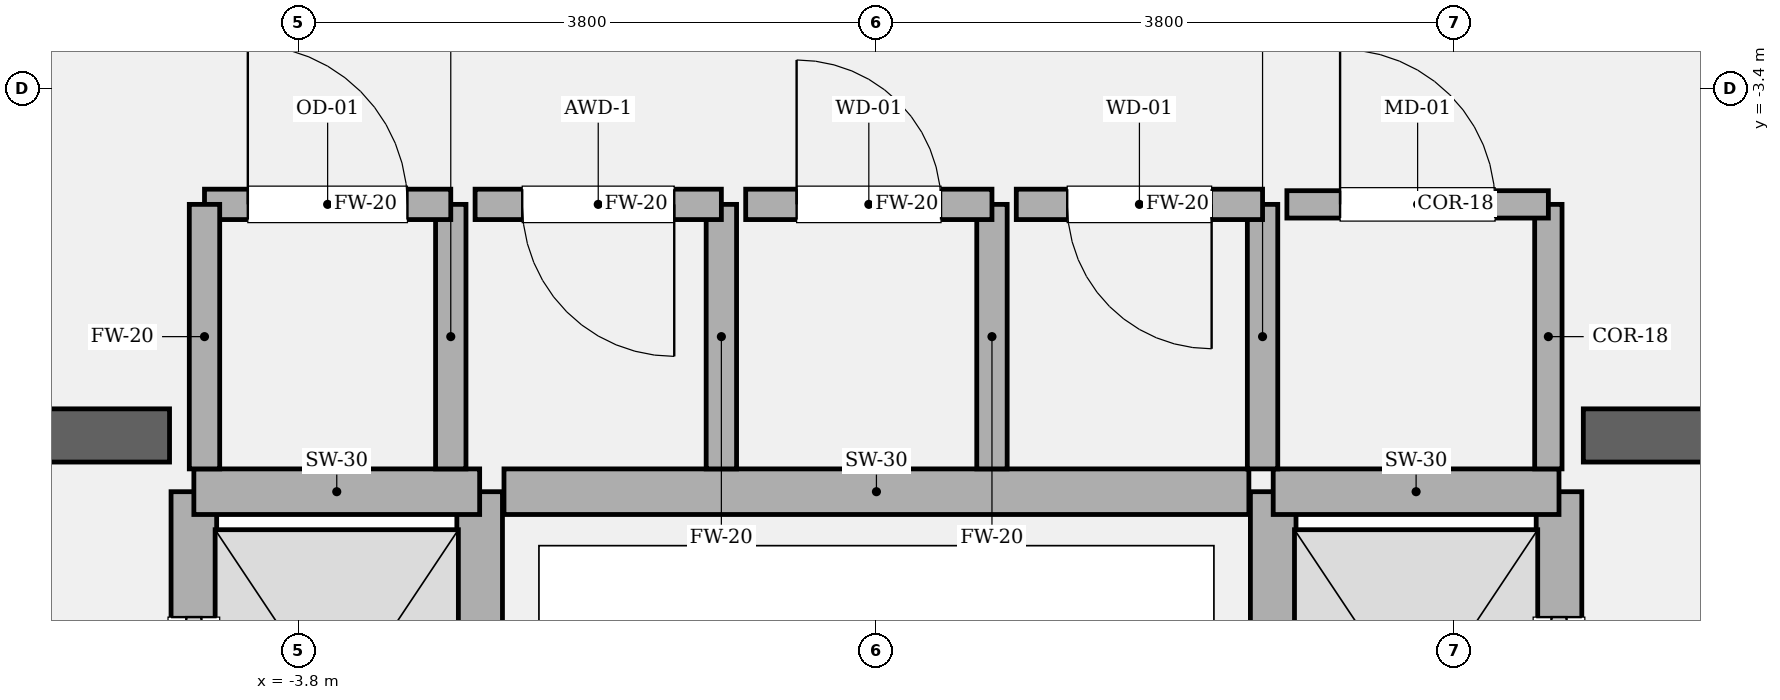
"""IFC4 building model, lengths in metres.
Left out: names, types, materials, properties, quantities, classifications, styles, units other than length and angle.
Written with IfcOpenShell. Run it as: python <this file> out.ifc"""

import sys

from ifc_helpers import new_model, si_unit, direction, frame, frame_2d, origin, place, context, subcontext, project, spatial, rectangle, extrude, element, fill, save


model = new_model("IFC4")
c1 = context("Model", 3, precision=1e-05, world=origin(), true_north=direction((0.0, 1.0)))
c2 = subcontext(c1, "Body", "Model", "MODEL_VIEW")
j1 = project(units=[si_unit("LENGTHUNIT", "METRE"), si_unit("PLANEANGLEUNIT", "RADIAN")], contexts=[c1])
p1 = place(None, origin())
s1 = spatial("IfcSite", under=j1, at=p1, CompositionType="ELEMENT")
p2 = place(p1, origin())
s2 = spatial("IfcBuilding", under=s1, at=p2, CompositionType="ELEMENT")
p3 = place(p2, frame((0.0, 0.0, 52.5)))
s3 = spatial("IfcBuildingStorey", under=s2, at=p3, CompositionType="ELEMENT", Elevation=52.5)
p4 = place(p3, frame((-9.825, -5.68, 0.0), z_axis=(0.0, 0.0, 1.0), x_axis=(1.0, 0.0, 0.0)))
e1 = element("IfcWall", 1, at=p4, inside=s3, PredefinedType="SOLIDWALL", context=c2, shape_type="SweptSolid", body=[
    extrude(rectangle(XDim=5.175, YDim=0.35, at=frame_2d((2.587, 0.0))), origin(), (0.0, 0.0, 1.0), 4.05),
])
p5 = place(p4, frame((1.285, 0.0, 0.0)))
e2 = element("IfcOpeningElement", 2, at=p5, cuts=e1, PredefinedType="OPENING", context=c2, shape_type="SweptSolid", body=[
    extrude(rectangle(XDim=1.18, YDim=2.2, at=frame_2d((0.59, 1.1))), frame((0.0, 0.185, 0.0), z_axis=(0.0, -1.0, 0.0), x_axis=(1.0, 0.0, 0.0)), (0.0, 0.0, 1.0), 0.37),
])
p6 = place(p3, frame((4.65, -5.68, 0.0), z_axis=(0.0, 0.0, 1.0), x_axis=(1.0, 0.0, 0.0)))
e3 = element("IfcWall", 3, at=p6, inside=s3, PredefinedType="SOLIDWALL", context=c2, shape_type="SweptSolid", body=[
    extrude(rectangle(XDim=5.175, YDim=0.35, at=frame_2d((2.587, 0.0))), origin(), (0.0, 0.0, 1.0), 4.05),
])
p7 = place(p6, frame((2.71, 0.0, 0.0)))
e4 = element("IfcOpeningElement", 4, at=p7, cuts=e3, PredefinedType="OPENING", context=c2, shape_type="SweptSolid", body=[
    extrude(rectangle(XDim=1.18, YDim=2.2, at=frame_2d((0.59, 1.1))), frame((0.0, 0.185, 0.0), z_axis=(0.0, -1.0, 0.0), x_axis=(1.0, 0.0, 0.0)), (0.0, 0.0, 1.0), 0.37),
])
p8 = place(p3, frame((-4.49, -8.82, 0.0), z_axis=(0.0, 0.0, 1.0), x_axis=(0.0, 1.0, 0.0)))
e5 = element("IfcWall", 5, at=p8, inside=s3, PredefinedType="SOLIDWALL", context=c2, shape_type="SweptSolid", body=[
    extrude(rectangle(XDim=2.77, YDim=0.3, at=frame_2d((1.385, 0.0))), origin(), (0.0, 0.0, 1.0), 3.81),
])
p9 = place(p8, frame((0.825, 0.0, 0.0)))
e6 = element("IfcOpeningElement", 6, at=p9, cuts=e5, PredefinedType="OPENING", context=c2, shape_type="SweptSolid", body=[
    extrude(rectangle(XDim=1.12, YDim=2.25, at=frame_2d((0.56, 1.125))), frame((0.0, 0.16, 0.0), z_axis=(0.0, -1.0, 0.0), x_axis=(1.0, 0.0, 0.0)), (0.0, 0.0, 1.0), 0.32),
])
p10 = place(p3, frame((-2.61, -8.82, 0.0), z_axis=(0.0, 0.0, 1.0), x_axis=(0.0, 1.0, 0.0)))
e7 = element("IfcWall", 7, at=p10, inside=s3, PredefinedType="SOLIDWALL", context=c2, shape_type="SweptSolid", body=[
    extrude(rectangle(XDim=2.77, YDim=0.3, at=frame_2d((1.385, 0.0))), origin(), (0.0, 0.0, 1.0), 3.81),
])
p11 = place(p3, frame((-4.49, -6.05, 0.0), z_axis=(0.0, 0.0, 1.0), x_axis=(1.0, 0.0, 0.0)))
e8 = element("IfcWall", 8, at=p11, inside=s3, PredefinedType="SOLIDWALL", context=c2, shape_type="SweptSolid", body=[
    extrude(rectangle(XDim=1.88, YDim=0.3, at=frame_2d((0.94, 0.0))), origin(), (0.0, 0.0, 1.0), 3.81),
])
p12 = place(p3, frame((4.49, -8.82, 0.0), z_axis=(0.0, 0.0, 1.0), x_axis=(0.0, 1.0, 0.0)))
e9 = element("IfcWall", 9, at=p12, inside=s3, PredefinedType="SOLIDWALL", context=c2, shape_type="SweptSolid", body=[
    extrude(rectangle(XDim=2.77, YDim=0.3, at=frame_2d((1.385, 0.0))), origin(), (0.0, 0.0, 1.0), 3.81),
])
p13 = place(p12, frame((0.825, 0.0, 0.0)))
e10 = element("IfcOpeningElement", 10, at=p13, cuts=e9, PredefinedType="OPENING", context=c2, shape_type="SweptSolid", body=[
    extrude(rectangle(XDim=1.12, YDim=2.25, at=frame_2d((0.56, 1.125))), frame((0.0, 0.16, 0.0), z_axis=(0.0, -1.0, 0.0), x_axis=(1.0, 0.0, 0.0)), (0.0, 0.0, 1.0), 0.32),
])
p14 = place(p3, frame((2.61, -8.82, 0.0), z_axis=(0.0, 0.0, 1.0), x_axis=(0.0, 1.0, 0.0)))
e11 = element("IfcWall", 11, at=p14, inside=s3, PredefinedType="SOLIDWALL", context=c2, shape_type="SweptSolid", body=[
    extrude(rectangle(XDim=2.77, YDim=0.3, at=frame_2d((1.385, 0.0))), origin(), (0.0, 0.0, 1.0), 3.81),
])
p15 = place(p3, frame((2.61, -6.05, 0.0), z_axis=(0.0, 0.0, 1.0), x_axis=(1.0, 0.0, 0.0)))
e12 = element("IfcWall", 12, at=p15, inside=s3, PredefinedType="SOLIDWALL", context=c2, shape_type="SweptSolid", body=[
    extrude(rectangle(XDim=1.88, YDim=0.3, at=frame_2d((0.94, 0.0))), origin(), (0.0, 0.0, 1.0), 3.81),
])
p16 = place(p3, frame((-2.45, -6.05, 0.0), z_axis=(0.0, 0.0, 1.0), x_axis=(1.0, 0.0, 0.0)))
e13 = element("IfcWall", 13, at=p16, inside=s3, PredefinedType="SOLIDWALL", context=c2, shape_type="SweptSolid", body=[
    extrude(rectangle(XDim=4.9, YDim=0.3, at=frame_2d((2.45, 0.0))), origin(), (0.0, 0.0, 1.0), 3.81),
])
p17 = place(p3, frame((-2.8, -5.9, 0.0), z_axis=(0.0, 0.0, 1.0), x_axis=(0.0, 1.0, 0.0)))
e14 = element("IfcWall", 14, at=p17, inside=s3, PredefinedType="SOLIDWALL", context=c2, shape_type="SweptSolid", body=[
    extrude(rectangle(XDim=1.74, YDim=0.2, at=frame_2d((0.87, 0.0))), origin(), (0.0, 0.0, 1.0), 3.81),
])
p18 = place(p3, frame((-2.8, -4.16, 0.0), z_axis=(0.0, 0.0, 1.0), x_axis=(-1.0, 0.0, 0.0)))
e15 = element("IfcWall", 15, at=p18, inside=s3, PredefinedType="SOLIDWALL", context=c2, shape_type="SweptSolid", body=[
    extrude(rectangle(XDim=1.62, YDim=0.2, at=frame_2d((0.81, 0.0))), origin(), (0.0, 0.0, 1.0), 3.81),
])
p19 = place(p18, frame((0.285, 0.0, 0.0)))
e16 = element("IfcOpeningElement", 16, at=p19, cuts=e15, PredefinedType="OPENING", context=c2, shape_type="SweptSolid", body=[
    extrude(rectangle(XDim=1.05, YDim=2.2, at=frame_2d((0.525, 1.1))), frame((0.0, 0.11, 0.0), z_axis=(0.0, -1.0, 0.0), x_axis=(1.0, 0.0, 0.0)), (0.0, 0.0, 1.0), 0.22),
])
for number, where, z_axis, x_axis in (
    (17, (-4.42, -4.16, 0.0), (0.0, 0.0, 1.0), (0.0, -1.0, 0.0)),
    (18, (-1.02, -5.9, 0.0), (0.0, 0.0, 1.0), (0.0, 1.0, 0.0)),
):
    element("IfcWall", number, at=place(p3, frame(where, z_axis=z_axis, x_axis=x_axis)), inside=s3, PredefinedType="SOLIDWALL", context=c2, shape_type="SweptSolid", body=[
        extrude(rectangle(XDim=1.74, YDim=0.2, at=frame_2d((0.87, 0.0))), origin(), (0.0, 0.0, 1.0), 3.81),
    ])
p20 = place(p3, frame((-1.02, -4.16, 0.0), z_axis=(0.0, 0.0, 1.0), x_axis=(-1.0, 0.0, 0.0)))
e19 = element("IfcWall", 19, at=p20, inside=s3, PredefinedType="SOLIDWALL", context=c2, shape_type="SweptSolid", body=[
    extrude(rectangle(XDim=1.62, YDim=0.2, at=frame_2d((0.81, 0.0))), origin(), (0.0, 0.0, 1.0), 3.81),
])
p21 = place(p20, frame((0.31, 0.0, 0.0)))
e20 = element("IfcOpeningElement", 20, at=p21, cuts=e19, PredefinedType="OPENING", context=c2, shape_type="SweptSolid", body=[
    extrude(rectangle(XDim=1.0, YDim=2.15, at=frame_2d((0.5, 1.075))), frame((0.0, 0.11, 0.0), z_axis=(0.0, -1.0, 0.0), x_axis=(1.0, 0.0, 0.0)), (0.0, 0.0, 1.0), 0.22),
])
p22 = place(p3, frame((0.76, -5.9, 0.0), z_axis=(0.0, 0.0, 1.0), x_axis=(0.0, 1.0, 0.0)))
e21 = element("IfcWall", 21, at=p22, inside=s3, PredefinedType="SOLIDWALL", context=c2, shape_type="SweptSolid", body=[
    extrude(rectangle(XDim=1.74, YDim=0.2, at=frame_2d((0.87, 0.0))), origin(), (0.0, 0.0, 1.0), 3.81),
])
p23 = place(p3, frame((0.76, -4.16, 0.0), z_axis=(0.0, 0.0, 1.0), x_axis=(-1.0, 0.0, 0.0)))
e22 = element("IfcWall", 22, at=p23, inside=s3, PredefinedType="SOLIDWALL", context=c2, shape_type="SweptSolid", body=[
    extrude(rectangle(XDim=1.62, YDim=0.2, at=frame_2d((0.81, 0.0))), origin(), (0.0, 0.0, 1.0), 3.81),
])
p24 = place(p23, frame((0.335, 0.0, 0.0)))
e23 = element("IfcOpeningElement", 23, at=p24, cuts=e22, PredefinedType="OPENING", context=c2, shape_type="SweptSolid", body=[
    extrude(rectangle(XDim=0.95, YDim=2.15, at=frame_2d((0.475, 1.075))), frame((0.0, 0.11, 0.0), z_axis=(0.0, -1.0, 0.0), x_axis=(1.0, 0.0, 0.0)), (0.0, 0.0, 1.0), 0.22),
])
p25 = place(p3, frame((2.54, -5.9, 0.0), z_axis=(0.0, 0.0, 1.0), x_axis=(0.0, 1.0, 0.0)))
e24 = element("IfcWall", 24, at=p25, inside=s3, PredefinedType="SOLIDWALL", context=c2, shape_type="SweptSolid", body=[
    extrude(rectangle(XDim=1.74, YDim=0.2, at=frame_2d((0.87, 0.0))), origin(), (0.0, 0.0, 1.0), 3.81),
])
p26 = place(p3, frame((2.54, -4.16, 0.0), z_axis=(0.0, 0.0, 1.0), x_axis=(-1.0, 0.0, 0.0)))
e25 = element("IfcWall", 25, at=p26, inside=s3, PredefinedType="SOLIDWALL", context=c2, shape_type="SweptSolid", body=[
    extrude(rectangle(XDim=1.62, YDim=0.2, at=frame_2d((0.81, 0.0))), origin(), (0.0, 0.0, 1.0), 3.81),
])
p27 = place(p26, frame((0.335, 0.0, 0.0)))
e26 = element("IfcOpeningElement", 26, at=p27, cuts=e25, PredefinedType="OPENING", context=c2, shape_type="SweptSolid", body=[
    extrude(rectangle(XDim=0.95, YDim=2.15, at=frame_2d((0.475, 1.075))), frame((0.0, 0.11, 0.0), z_axis=(0.0, -1.0, 0.0), x_axis=(1.0, 0.0, 0.0)), (0.0, 0.0, 1.0), 0.22),
])
p28 = place(p3, frame((4.42, -5.9, 0.0), z_axis=(0.0, 0.0, 1.0), x_axis=(0.0, 1.0, 0.0)))
e27 = element("IfcWall", 27, at=p28, inside=s3, PredefinedType="PARTITIONING", context=c2, shape_type="SweptSolid", body=[
    extrude(rectangle(XDim=1.74, YDim=0.18, at=frame_2d((0.87, 0.0))), origin(), (0.0, 0.0, 1.0), 3.81),
])
p29 = place(p3, frame((4.42, -4.16, 0.0), z_axis=(0.0, 0.0, 1.0), x_axis=(-1.0, 0.0, 0.0)))
e28 = element("IfcWall", 28, at=p29, inside=s3, PredefinedType="PARTITIONING", context=c2, shape_type="SweptSolid", body=[
    extrude(rectangle(XDim=1.72, YDim=0.18, at=frame_2d((0.86, 0.0))), origin(), (0.0, 0.0, 1.0), 3.81),
])
p30 = place(p29, frame((0.35, 0.0, 0.0)))
e29 = element("IfcOpeningElement", 29, at=p30, cuts=e28, PredefinedType="OPENING", context=c2, shape_type="SweptSolid", body=[
    extrude(rectangle(XDim=1.02, YDim=2.2, at=frame_2d((0.51, 1.1))), frame((0.0, 0.1, 0.0), z_axis=(0.0, -1.0, 0.0), x_axis=(1.0, 0.0, 0.0)), (0.0, 0.0, 1.0), 0.2),
])
p31 = place(p9, origin())
e30 = element("IfcDoor", 30, at=p31, inside=s3, OperationType="SLIDING_TO_LEFT", PredefinedType="DOOR", context=c2, shape_type="SweptSolid", body=[
    extrude(rectangle(XDim=1.12, YDim=2.25, at=frame_2d((0.56, 1.125))), frame((0.0, 0.025, 0.0), z_axis=(0.0, -1.0, 0.0), x_axis=(1.0, 0.0, 0.0)), (0.0, 0.0, 1.0), 0.05),
])
fill(e6, e30)
p32 = place(p13, origin())
e31 = element("IfcDoor", 31, at=p32, inside=s3, OperationType="SLIDING_TO_RIGHT", PredefinedType="DOOR", context=c2, shape_type="SweptSolid", body=[
    extrude(rectangle(XDim=1.12, YDim=2.25, at=frame_2d((0.56, 1.125))), frame((0.0, 0.025, 0.0), z_axis=(0.0, -1.0, 0.0), x_axis=(1.0, 0.0, 0.0)), (0.0, 0.0, 1.0), 0.05),
])
fill(e10, e31)
p33 = place(p19, origin())
e32 = element("IfcDoor", 32, at=p33, inside=s3, OperationType="SINGLE_SWING_RIGHT", PredefinedType="DOOR", context=c2, shape_type="SweptSolid", body=[
    extrude(rectangle(XDim=1.05, YDim=2.2, at=frame_2d((0.525, 1.1))), frame((0.0, 0.025, 0.0), z_axis=(0.0, -1.0, 0.0), x_axis=(1.0, 0.0, 0.0)), (0.0, 0.0, 1.0), 0.05),
])
fill(e16, e32)
p34 = place(p21, origin())
e33 = element("IfcDoor", 33, at=p34, inside=s3, OperationType="SINGLE_SWING_LEFT", PredefinedType="DOOR", context=c2, shape_type="SweptSolid", body=[
    extrude(rectangle(XDim=1.0, YDim=2.15, at=frame_2d((0.5, 1.075))), frame((0.0, 0.025, 0.0), z_axis=(0.0, -1.0, 0.0), x_axis=(1.0, 0.0, 0.0)), (0.0, 0.0, 1.0), 0.05),
])
fill(e20, e33)
p35 = place(p24, origin())
e34 = element("IfcDoor", 34, at=p35, inside=s3, OperationType="SINGLE_SWING_RIGHT", PredefinedType="DOOR", context=c2, shape_type="SweptSolid", body=[
    extrude(rectangle(XDim=0.95, YDim=2.15, at=frame_2d((0.475, 1.075))), frame((0.0, 0.025, 0.0), z_axis=(0.0, -1.0, 0.0), x_axis=(1.0, 0.0, 0.0)), (0.0, 0.0, 1.0), 0.05),
])
fill(e23, e34)
p36 = place(p27, origin())
e35 = element("IfcDoor", 35, at=p36, inside=s3, OperationType="SINGLE_SWING_LEFT", PredefinedType="DOOR", context=c2, shape_type="SweptSolid", body=[
    extrude(rectangle(XDim=0.95, YDim=2.15, at=frame_2d((0.475, 1.075))), frame((0.0, 0.025, 0.0), z_axis=(0.0, -1.0, 0.0), x_axis=(1.0, 0.0, 0.0)), (0.0, 0.0, 1.0), 0.05),
])
fill(e26, e35)
p37 = place(p30, origin())
e36 = element("IfcDoor", 36, at=p37, inside=s3, OperationType="SINGLE_SWING_RIGHT", PredefinedType="DOOR", context=c2, shape_type="SweptSolid", body=[
    extrude(rectangle(XDim=1.02, YDim=2.2, at=frame_2d((0.51, 1.1))), frame((0.0, 0.025, 0.0), z_axis=(0.0, -1.0, 0.0), x_axis=(1.0, 0.0, 0.0)), (0.0, 0.0, 1.0), 0.05),
])
fill(e29, e36)
save(model, sys.argv[1])
